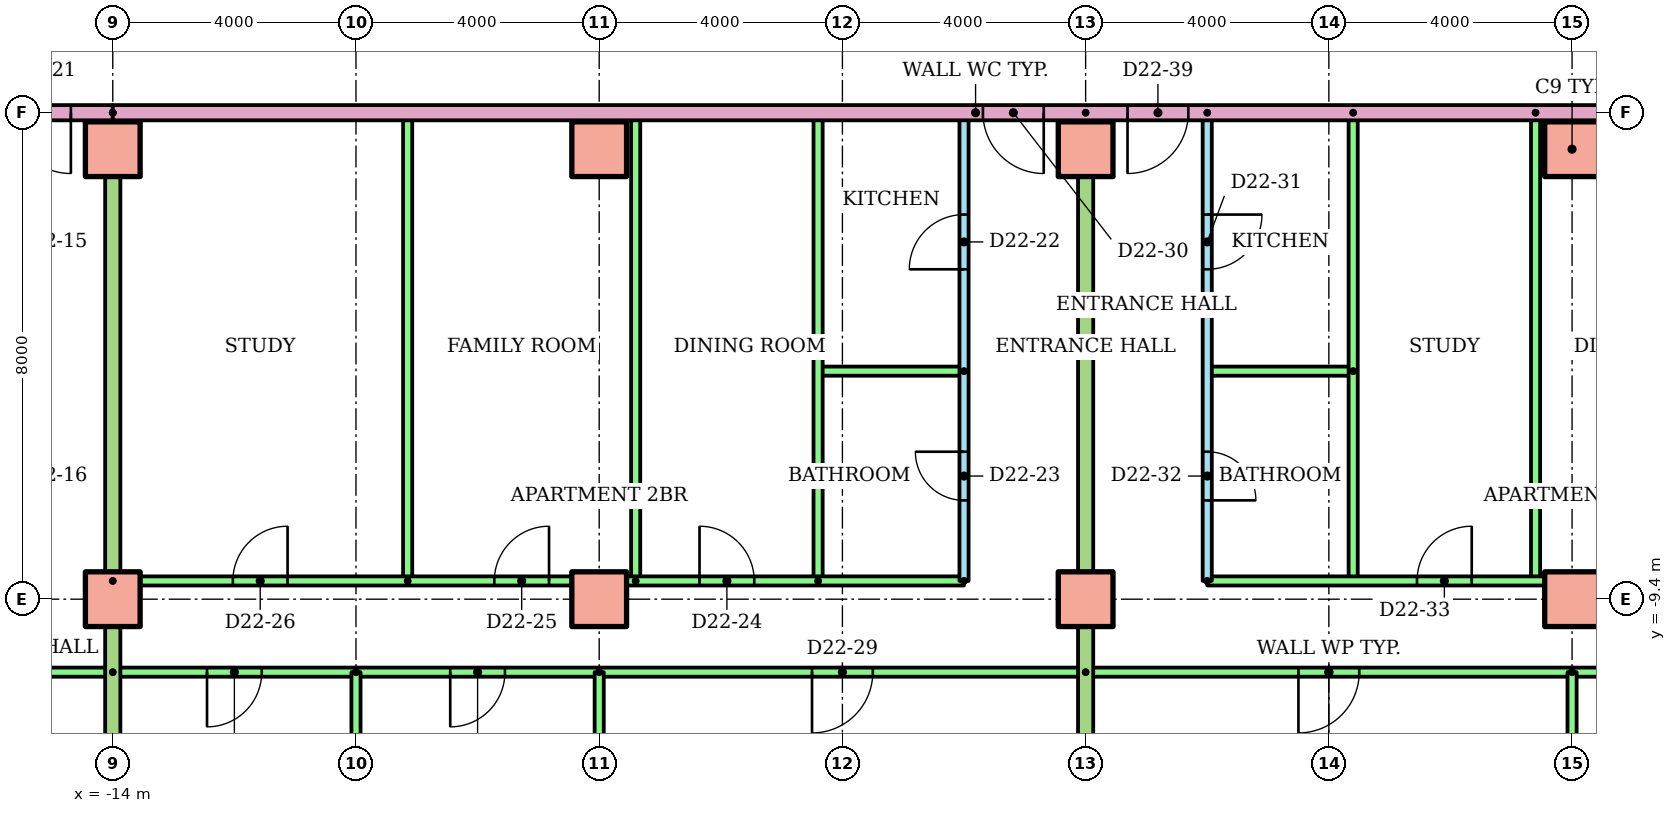
"""IFC4 building model, lengths in metres.
Left out: names, types, materials, properties, quantities, classifications, styles, units other than length and angle.
Written with IfcOpenShell. Run it as: python <this file> out.ifc"""

import sys

from ifc_helpers import new_model, si_unit, direction, frame, frame_2d, origin, origin_2d, place, context, subcontext, project, spatial, rectangle, extrude, element, fill, save


model = new_model("IFC4")
c1 = context("Model", 3, precision=1e-05, world=origin(), true_north=direction((0.0, 1.0)))
c2 = subcontext(c1, "Body", "Model", "MODEL_VIEW")
j1 = project(units=[si_unit("LENGTHUNIT", "METRE"), si_unit("PLANEANGLEUNIT", "RADIAN")], contexts=[c1])
p1 = place(None, origin())
s1 = spatial("IfcSite", under=j1, at=p1, CompositionType="ELEMENT")
p2 = place(p1, origin())
s2 = spatial("IfcBuilding", under=s1, at=p2, CompositionType="ELEMENT")
p3 = place(p2, frame((0.0, 0.0, 87.1)))
s3 = spatial("IfcBuildingStorey", under=s2, at=p3, CompositionType="ELEMENT", Elevation=87.1)
for number, where in (
    (1, (-14.0, -9.4, 0.0)),
    (2, (-6.0, -9.4, 0.0)),
    (3, (2.0, -9.4, 0.0)),
    (4, (10.0, -9.4, 0.0)),
    (5, (-14.0, -2.0, 0.0)),
    (6, (-6.0, -2.0, 0.0)),
    (7, (2.0, -2.0, 0.0)),
    (8, (10.0, -2.0, 0.0)),
):
    element("IfcColumn", number, at=place(p3, frame(where)), inside=s3, PredefinedType="COLUMN", context=c2, shape_type="SweptSolid", body=[
        extrude(rectangle(XDim=0.9, YDim=0.9, at=origin_2d()), origin(), (0.0, 0.0, 1.0), 3.2),
    ])
p4 = place(p3, frame((-14.0, -10.6, 0.0), z_axis=(0.0, 0.0, 1.0), x_axis=(-1.0, 0.0, 0.0)))
e9 = element("IfcWall", 9, at=p4, inside=s3, PredefinedType="PARTITIONING", context=c2, shape_type="SweptSolid", body=[
    extrude(rectangle(XDim=14.62, YDim=0.15, at=frame_2d((7.31, 0.0))), origin(), (0.0, 0.0, 1.0), 2.4),
])
p5 = place(p4, frame((11.7, 0.0, 0.0)))
e10 = element("IfcOpeningElement", 10, at=p5, cuts=e9, PredefinedType="OPENING", context=c2, shape_type="SweptSolid", body=[
    extrude(rectangle(XDim=0.9, YDim=2.1, at=frame_2d((0.45, 1.05))), frame((0.0, 0.085, 0.0), z_axis=(0.0, -1.0, 0.0), x_axis=(1.0, 0.0, 0.0)), (0.0, 0.0, 1.0), 0.17),
])
p6 = place(p4, frame((4.45, 0.0, 0.0)))
e11 = element("IfcOpeningElement", 11, at=p6, cuts=e9, PredefinedType="OPENING", context=c2, shape_type="SweptSolid", body=[
    extrude(rectangle(XDim=1.0, YDim=2.1, at=frame_2d((0.5, 1.05))), frame((0.0, 0.085, 0.0), z_axis=(0.0, -1.0, 0.0), x_axis=(1.0, 0.0, 0.0)), (0.0, 0.0, 1.0), 0.17),
])
p7 = place(p3, frame((0.0, -9.1, 0.0), z_axis=(0.0, 0.0, 1.0), x_axis=(0.0, 1.0, 0.0)))
e12 = element("IfcWall", 12, at=p7, inside=s3, PredefinedType="PARTITIONING", context=c2, shape_type="SweptSolid", body=[
    extrude(rectangle(XDim=7.7, YDim=0.15, at=frame_2d((3.85, 0.0))), origin(), (0.0, 0.0, 1.0), 2.4),
])
p8 = place(p7, frame((5.125, 0.0, 0.0)))
e13 = element("IfcOpeningElement", 13, at=p8, cuts=e12, PredefinedType="OPENING", context=c2, shape_type="SweptSolid", body=[
    extrude(rectangle(XDim=0.9, YDim=2.1, at=frame_2d((0.45, 1.05))), frame((0.0, 0.085, 0.0), z_axis=(0.0, -1.0, 0.0), x_axis=(1.0, 0.0, 0.0)), (0.0, 0.0, 1.0), 0.17),
])
p9 = place(p7, frame((1.325, 0.0, 0.0)))
e14 = element("IfcOpeningElement", 14, at=p9, cuts=e12, PredefinedType="OPENING", context=c2, shape_type="SweptSolid", body=[
    extrude(rectangle(XDim=0.8, YDim=2.1, at=frame_2d((0.4, 1.05))), frame((0.0, 0.085, 0.0), z_axis=(0.0, -1.0, 0.0), x_axis=(1.0, 0.0, 0.0)), (0.0, 0.0, 1.0), 0.17),
])
p10 = place(p3, frame((0.0, -5.65, 0.0), z_axis=(0.0, 0.0, 1.0), x_axis=(-1.0, 0.0, 0.0)))
e15 = element("IfcWall", 15, at=p10, inside=s3, PredefinedType="PARTITIONING", context=c2, shape_type="SweptSolid", body=[
    extrude(rectangle(XDim=2.4, YDim=0.15, at=frame_2d((1.2, 0.0))), origin(), (0.0, 0.0, 1.0), 2.4),
])
for number, where, z_axis, x_axis in (
    (16, (-2.4, -9.1, 0.0), (0.0, 0.0, 1.0), (0.0, 1.0, 0.0)),
    (17, (-5.4, -9.1, 0.0), (0.0, 0.0, 1.0), (0.0, 1.0, 0.0)),
    (18, (-9.15, -9.1, 0.0), (0.0, 0.0, 1.0), (0.0, 1.0, 0.0)),
):
    element("IfcWall", number, at=place(p3, frame(where, z_axis=z_axis, x_axis=x_axis)), inside=s3, PredefinedType="PARTITIONING", context=c2, shape_type="SweptSolid", body=[
        extrude(rectangle(XDim=7.7, YDim=0.15, at=frame_2d((3.85, 0.0))), origin(), (0.0, 0.0, 1.0), 2.4),
    ])
p11 = place(p3, frame((-14.0, -9.1, 0.0)))
e19 = element("IfcWall", 19, at=p11, inside=s3, PredefinedType="PARTITIONING", context=c2, shape_type="SweptSolid", body=[
    extrude(rectangle(XDim=14.0, YDim=0.15, at=frame_2d((7.0, 0.0))), origin(), (0.0, 0.0, 1.0), 2.4),
])
p12 = place(p11, frame((9.65, 0.0, 0.0)))
e20 = element("IfcOpeningElement", 20, at=p12, cuts=e19, PredefinedType="OPENING", context=c2, shape_type="SweptSolid", body=[
    extrude(rectangle(XDim=0.9, YDim=2.1, at=frame_2d((0.45, 1.05))), frame((0.0, 0.085, 0.0), z_axis=(0.0, -1.0, 0.0), x_axis=(1.0, 0.0, 0.0)), (0.0, 0.0, 1.0), 0.17),
])
p13 = place(p11, frame((6.275, 0.0, 0.0)))
e21 = element("IfcOpeningElement", 21, at=p13, cuts=e19, PredefinedType="OPENING", context=c2, shape_type="SweptSolid", body=[
    extrude(rectangle(XDim=0.9, YDim=2.1, at=frame_2d((0.45, 1.05))), frame((0.0, 0.085, 0.0), z_axis=(0.0, -1.0, 0.0), x_axis=(1.0, 0.0, 0.0)), (0.0, 0.0, 1.0), 0.17),
])
p14 = place(p11, frame((1.975, 0.0, 0.0)))
e22 = element("IfcOpeningElement", 22, at=p14, cuts=e19, PredefinedType="OPENING", context=c2, shape_type="SweptSolid", body=[
    extrude(rectangle(XDim=0.9, YDim=2.1, at=frame_2d((0.45, 1.05))), frame((0.0, 0.085, 0.0), z_axis=(0.0, -1.0, 0.0), x_axis=(1.0, 0.0, 0.0)), (0.0, 0.0, 1.0), 0.17),
])
p15 = place(p3, frame((2.0, -10.6, 0.0), z_axis=(0.0, 0.0, 1.0), x_axis=(-1.0, 0.0, 0.0)))
e23 = element("IfcWall", 23, at=p15, inside=s3, PredefinedType="PARTITIONING", context=c2, shape_type="SweptSolid", body=[
    extrude(rectangle(XDim=16.0, YDim=0.15, at=frame_2d((8.0, 0.0))), origin(), (0.0, 0.0, 1.0), 2.4),
])
p16 = place(p15, frame((13.55, 0.0, 0.0)))
e24 = element("IfcOpeningElement", 24, at=p16, cuts=e23, PredefinedType="OPENING", context=c2, shape_type="SweptSolid", body=[
    extrude(rectangle(XDim=0.9, YDim=2.1, at=frame_2d((0.45, 1.05))), frame((0.0, 0.085, 0.0), z_axis=(0.0, -1.0, 0.0), x_axis=(1.0, 0.0, 0.0)), (0.0, 0.0, 1.0), 0.17),
])
p17 = place(p15, frame((9.55, 0.0, 0.0)))
e25 = element("IfcOpeningElement", 25, at=p17, cuts=e23, PredefinedType="OPENING", context=c2, shape_type="SweptSolid", body=[
    extrude(rectangle(XDim=0.9, YDim=2.1, at=frame_2d((0.45, 1.05))), frame((0.0, 0.085, 0.0), z_axis=(0.0, -1.0, 0.0), x_axis=(1.0, 0.0, 0.0)), (0.0, 0.0, 1.0), 0.17),
])
p18 = place(p15, frame((3.5, 0.0, 0.0)))
e26 = element("IfcOpeningElement", 26, at=p18, cuts=e23, PredefinedType="OPENING", context=c2, shape_type="SweptSolid", body=[
    extrude(rectangle(XDim=1.0, YDim=2.1, at=frame_2d((0.5, 1.05))), frame((0.0, 0.085, 0.0), z_axis=(0.0, -1.0, 0.0), x_axis=(1.0, 0.0, 0.0)), (0.0, 0.0, 1.0), 0.17),
])
p19 = place(p3, frame((-10.0, -10.6, 0.0), z_axis=(0.0, 0.0, 1.0), x_axis=(0.0, -1.0, 0.0)))
e27 = element("IfcWall", 27, at=p19, inside=s3, PredefinedType="PARTITIONING", context=c2, shape_type="SweptSolid", body=[
    extrude(rectangle(XDim=5.621, YDim=0.15, at=frame_2d((2.811, 0.0))), origin(), (0.0, 0.0, 1.0), 2.4),
])
p20 = place(p3, frame((-6.0, -10.6, 0.0), z_axis=(0.0, 0.0, 1.0), x_axis=(0.0, -1.0, 0.0)))
e28 = element("IfcWall", 28, at=p20, inside=s3, PredefinedType="PARTITIONING", context=c2, shape_type="SweptSolid", body=[
    extrude(rectangle(XDim=5.61, YDim=0.15, at=frame_2d((2.805, 0.0))), origin(), (0.0, 0.0, 1.0), 2.4),
])
p21 = place(p3, frame((-14.0, -1.4, 0.0), z_axis=(0.0, 0.0, 1.0), x_axis=(0.0, -1.0, 0.0)))
e29 = element("IfcWall", 29, at=p21, inside=s3, PredefinedType="PARTITIONING", context=c2, shape_type="SweptSolid", body=[
    extrude(rectangle(XDim=14.81, YDim=0.25, at=frame_2d((7.405, 0.0))), origin(), (0.0, 0.0, 1.0), 2.4),
])
p22 = place(p3, frame((4.0, -1.4, 0.0), z_axis=(0.0, 0.0, 1.0), x_axis=(0.0, -1.0, 0.0)))
e30 = element("IfcWall", 30, at=p22, inside=s3, PredefinedType="PARTITIONING", context=c2, shape_type="SweptSolid", body=[
    extrude(rectangle(XDim=7.7, YDim=0.15, at=frame_2d((3.85, 0.0))), origin(), (0.0, 0.0, 1.0), 2.4),
])
p23 = place(p22, frame((1.675, 0.0, 0.0)))
e31 = element("IfcOpeningElement", 31, at=p23, cuts=e30, PredefinedType="OPENING", context=c2, shape_type="SweptSolid", body=[
    extrude(rectangle(XDim=0.9, YDim=2.1, at=frame_2d((0.45, 1.05))), frame((0.0, 0.085, 0.0), z_axis=(0.0, -1.0, 0.0), x_axis=(1.0, 0.0, 0.0)), (0.0, 0.0, 1.0), 0.17),
])
p24 = place(p22, frame((5.575, 0.0, 0.0)))
e32 = element("IfcOpeningElement", 32, at=p24, cuts=e30, PredefinedType="OPENING", context=c2, shape_type="SweptSolid", body=[
    extrude(rectangle(XDim=0.8, YDim=2.1, at=frame_2d((0.4, 1.05))), frame((0.0, 0.085, 0.0), z_axis=(0.0, -1.0, 0.0), x_axis=(1.0, 0.0, 0.0)), (0.0, 0.0, 1.0), 0.17),
])
p25 = place(p3, frame((6.4, -5.65, 0.0), z_axis=(0.0, 0.0, 1.0), x_axis=(-1.0, 0.0, 0.0)))
e33 = element("IfcWall", 33, at=p25, inside=s3, PredefinedType="PARTITIONING", context=c2, shape_type="SweptSolid", body=[
    extrude(rectangle(XDim=2.4, YDim=0.15, at=frame_2d((1.2, 0.0))), origin(), (0.0, 0.0, 1.0), 2.4),
])
for number, where, z_axis, x_axis in (
    (34, (6.4, -1.4, 0.0), (0.0, 0.0, 1.0), (0.0, -1.0, 0.0)),
    (35, (9.4, -1.4, 0.0), (0.0, 0.0, 1.0), (0.0, -1.0, 0.0)),
):
    element("IfcWall", number, at=place(p3, frame(where, z_axis=z_axis, x_axis=x_axis)), inside=s3, PredefinedType="PARTITIONING", context=c2, shape_type="SweptSolid", body=[
        extrude(rectangle(XDim=7.7, YDim=0.15, at=frame_2d((3.85, 0.0))), origin(), (0.0, 0.0, 1.0), 2.4),
    ])
p26 = place(p3, frame((4.0, -9.1, 0.0)))
e36 = element("IfcWall", 36, at=p26, inside=s3, PredefinedType="PARTITIONING", context=c2, shape_type="SweptSolid", body=[
    extrude(rectangle(XDim=14.0, YDim=0.15, at=frame_2d((7.0, 0.0))), origin(), (0.0, 0.0, 1.0), 2.4),
])
p27 = place(p26, frame((3.45, 0.0, 0.0)))
e37 = element("IfcOpeningElement", 37, at=p27, cuts=e36, PredefinedType="OPENING", context=c2, shape_type="SweptSolid", body=[
    extrude(rectangle(XDim=0.9, YDim=2.1, at=frame_2d((0.45, 1.05))), frame((0.0, 0.085, 0.0), z_axis=(0.0, -1.0, 0.0), x_axis=(1.0, 0.0, 0.0)), (0.0, 0.0, 1.0), 0.17),
])
p28 = place(p26, frame((6.825, 0.0, 0.0)))
e38 = element("IfcOpeningElement", 38, at=p28, cuts=e36, PredefinedType="OPENING", context=c2, shape_type="SweptSolid", body=[
    extrude(rectangle(XDim=0.9, YDim=2.1, at=frame_2d((0.45, 1.05))), frame((0.0, 0.085, 0.0), z_axis=(0.0, -1.0, 0.0), x_axis=(1.0, 0.0, 0.0)), (0.0, 0.0, 1.0), 0.17),
])
p29 = place(p26, frame((11.125, 0.0, 0.0)))
e39 = element("IfcOpeningElement", 39, at=p29, cuts=e36, PredefinedType="OPENING", context=c2, shape_type="SweptSolid", body=[
    extrude(rectangle(XDim=0.9, YDim=2.1, at=frame_2d((0.45, 1.05))), frame((0.0, 0.085, 0.0), z_axis=(0.0, -1.0, 0.0), x_axis=(1.0, 0.0, 0.0)), (0.0, 0.0, 1.0), 0.17),
])
p30 = place(p3, frame((18.0, -10.6, 0.0), z_axis=(0.0, 0.0, 1.0), x_axis=(-1.0, 0.0, 0.0)))
e40 = element("IfcWall", 40, at=p30, inside=s3, PredefinedType="PARTITIONING", context=c2, shape_type="SweptSolid", body=[
    extrude(rectangle(XDim=16.0, YDim=0.15, at=frame_2d((8.0, 0.0))), origin(), (0.0, 0.0, 1.0), 2.4),
])
p31 = place(p30, frame((11.5, 0.0, 0.0)))
e41 = element("IfcOpeningElement", 41, at=p31, cuts=e40, PredefinedType="OPENING", context=c2, shape_type="SweptSolid", body=[
    extrude(rectangle(XDim=1.0, YDim=2.1, at=frame_2d((0.5, 1.05))), frame((0.0, 0.085, 0.0), z_axis=(0.0, -1.0, 0.0), x_axis=(1.0, 0.0, 0.0)), (0.0, 0.0, 1.0), 0.17),
])
p32 = place(p30, frame((5.55, 0.0, 0.0)))
e42 = element("IfcOpeningElement", 42, at=p32, cuts=e40, PredefinedType="OPENING", context=c2, shape_type="SweptSolid", body=[
    extrude(rectangle(XDim=0.9, YDim=2.1, at=frame_2d((0.45, 1.05))), frame((0.0, 0.085, 0.0), z_axis=(0.0, -1.0, 0.0), x_axis=(1.0, 0.0, 0.0)), (0.0, 0.0, 1.0), 0.17),
])
p33 = place(p30, frame((1.55, 0.0, 0.0)))
e43 = element("IfcOpeningElement", 43, at=p33, cuts=e40, PredefinedType="OPENING", context=c2, shape_type="SweptSolid", body=[
    extrude(rectangle(XDim=0.9, YDim=2.1, at=frame_2d((0.45, 1.05))), frame((0.0, 0.085, 0.0), z_axis=(0.0, -1.0, 0.0), x_axis=(1.0, 0.0, 0.0)), (0.0, 0.0, 1.0), 0.17),
])
p34 = place(p3, frame((10.0, -10.6, 0.0), z_axis=(0.0, 0.0, 1.0), x_axis=(0.0, -1.0, 0.0)))
e44 = element("IfcWall", 44, at=p34, inside=s3, PredefinedType="PARTITIONING", context=c2, shape_type="SweptSolid", body=[
    extrude(rectangle(XDim=5.61, YDim=0.15, at=frame_2d((2.805, 0.0))), origin(), (0.0, 0.0, 1.0), 2.4),
])
p35 = place(p3, frame((2.0, -1.4, 0.0), z_axis=(0.0, 0.0, 1.0), x_axis=(0.0, -1.0, 0.0)))
e45 = element("IfcWall", 45, at=p35, inside=s3, PredefinedType="PARTITIONING", context=c2, shape_type="SweptSolid", body=[
    extrude(rectangle(XDim=14.81, YDim=0.25, at=frame_2d((7.405, 0.0))), origin(), (0.0, 0.0, 1.0), 2.4),
])
p36 = place(p3, frame((-14.0, -1.4, 0.0), z_axis=(0.0, 0.0, 1.0), x_axis=(-1.0, 0.0, 0.0)))
e46 = element("IfcWall", 46, at=p36, inside=s3, PredefinedType="PARTITIONING", context=c2, shape_type="SweptSolid", body=[
    extrude(rectangle(XDim=14.62, YDim=0.25, at=frame_2d((7.31, 0.0))), origin(), (0.0, 0.0, 1.0), 2.4),
])
p37 = place(p36, frame((0.689, 0.0, 0.0)))
e47 = element("IfcOpeningElement", 47, at=p37, cuts=e46, PredefinedType="OPENING", context=c2, shape_type="SweptSolid", body=[
    extrude(rectangle(XDim=1.0, YDim=2.1, at=frame_2d((0.5, 1.05))), frame((0.0, 0.135, 0.0), z_axis=(0.0, -1.0, 0.0), x_axis=(1.0, 0.0, 0.0)), (0.0, 0.0, 1.0), 0.27),
])
p38 = place(p3, frame((14.0, -1.4, 0.0), z_axis=(0.0, 0.0, 1.0), x_axis=(-1.0, 0.0, 0.0)))
e48 = element("IfcWall", 48, at=p38, inside=s3, PredefinedType="PARTITIONING", context=c2, shape_type="SweptSolid", body=[
    extrude(rectangle(XDim=28.0, YDim=0.25, at=frame_2d((14.0, 0.0))), origin(), (0.0, 0.0, 1.0), 2.4),
])
p39 = place(p38, frame((12.689, 0.0, 0.0)))
e49 = element("IfcOpeningElement", 49, at=p39, cuts=e48, PredefinedType="OPENING", context=c2, shape_type="SweptSolid", body=[
    extrude(rectangle(XDim=1.0, YDim=2.1, at=frame_2d((0.5, 1.05))), frame((0.0, 0.135, 0.0), z_axis=(0.0, -1.0, 0.0), x_axis=(1.0, 0.0, 0.0)), (0.0, 0.0, 1.0), 0.27),
])
p40 = place(p38, frame((10.311, 0.0, 0.0)))
e50 = element("IfcOpeningElement", 50, at=p40, cuts=e48, PredefinedType="OPENING", context=c2, shape_type="SweptSolid", body=[
    extrude(rectangle(XDim=1.0, YDim=2.1, at=frame_2d((0.5, 1.05))), frame((0.0, 0.135, 0.0), z_axis=(0.0, -1.0, 0.0), x_axis=(1.0, 0.0, 0.0)), (0.0, 0.0, 1.0), 0.27),
])
p41 = place(p37, origin())
e51 = element("IfcDoor", 51, at=p41, inside=s3, OperationType="SINGLE_SWING_LEFT", PredefinedType="DOOR", context=c2, shape_type="SweptSolid", body=[
    extrude(rectangle(XDim=1.0, YDim=2.1, at=frame_2d((0.5, 1.05))), frame((0.0, 0.025, 0.0), z_axis=(0.0, -1.0, 0.0), x_axis=(1.0, 0.0, 0.0)), (0.0, 0.0, 1.0), 0.05),
])
fill(e47, e51)
p42 = place(p8, origin())
e52 = element("IfcDoor", 52, at=p42, inside=s3, OperationType="SINGLE_SWING_LEFT", PredefinedType="DOOR", context=c2, shape_type="SweptSolid", body=[
    extrude(rectangle(XDim=0.9, YDim=2.1, at=frame_2d((0.45, 1.05))), frame((0.0, 0.025, 0.0), z_axis=(0.0, -1.0, 0.0), x_axis=(1.0, 0.0, 0.0)), (0.0, 0.0, 1.0), 0.05),
])
fill(e13, e52)
p43 = place(p9, origin())
e53 = element("IfcDoor", 53, at=p43, inside=s3, OperationType="SINGLE_SWING_RIGHT", PredefinedType="DOOR", context=c2, shape_type="SweptSolid", body=[
    extrude(rectangle(XDim=0.8, YDim=2.1, at=frame_2d((0.4, 1.05))), frame((0.0, 0.025, 0.0), z_axis=(0.0, -1.0, 0.0), x_axis=(1.0, 0.0, 0.0)), (0.0, 0.0, 1.0), 0.05),
])
fill(e14, e53)
p44 = place(p12, origin())
e54 = element("IfcDoor", 54, at=p44, inside=s3, OperationType="SINGLE_SWING_LEFT", PredefinedType="DOOR", context=c2, shape_type="SweptSolid", body=[
    extrude(rectangle(XDim=0.9, YDim=2.1, at=frame_2d((0.45, 1.05))), frame((0.0, 0.025, 0.0), z_axis=(0.0, -1.0, 0.0), x_axis=(1.0, 0.0, 0.0)), (0.0, 0.0, 1.0), 0.05),
])
fill(e20, e54)
p45 = place(p13, origin())
e55 = element("IfcDoor", 55, at=p45, inside=s3, OperationType="SINGLE_SWING_RIGHT", PredefinedType="DOOR", context=c2, shape_type="SweptSolid", body=[
    extrude(rectangle(XDim=0.9, YDim=2.1, at=frame_2d((0.45, 1.05))), frame((0.0, 0.025, 0.0), z_axis=(0.0, -1.0, 0.0), x_axis=(1.0, 0.0, 0.0)), (0.0, 0.0, 1.0), 0.05),
])
fill(e21, e55)
p46 = place(p14, origin())
e56 = element("IfcDoor", 56, at=p46, inside=s3, OperationType="SINGLE_SWING_RIGHT", PredefinedType="DOOR", context=c2, shape_type="SweptSolid", body=[
    extrude(rectangle(XDim=0.9, YDim=2.1, at=frame_2d((0.45, 1.05))), frame((0.0, 0.025, 0.0), z_axis=(0.0, -1.0, 0.0), x_axis=(1.0, 0.0, 0.0)), (0.0, 0.0, 1.0), 0.05),
])
fill(e22, e56)
p47 = place(p16, origin())
e57 = element("IfcDoor", 57, at=p47, inside=s3, OperationType="SINGLE_SWING_RIGHT", PredefinedType="DOOR", context=c2, shape_type="SweptSolid", body=[
    extrude(rectangle(XDim=0.9, YDim=2.1, at=frame_2d((0.45, 1.05))), frame((0.0, 0.025, 0.0), z_axis=(0.0, -1.0, 0.0), x_axis=(1.0, 0.0, 0.0)), (0.0, 0.0, 1.0), 0.05),
])
fill(e24, e57)
p48 = place(p17, origin())
e58 = element("IfcDoor", 58, at=p48, inside=s3, OperationType="SINGLE_SWING_RIGHT", PredefinedType="DOOR", context=c2, shape_type="SweptSolid", body=[
    extrude(rectangle(XDim=0.9, YDim=2.1, at=frame_2d((0.45, 1.05))), frame((0.0, 0.025, 0.0), z_axis=(0.0, -1.0, 0.0), x_axis=(1.0, 0.0, 0.0)), (0.0, 0.0, 1.0), 0.05),
])
fill(e25, e58)
p49 = place(p18, origin())
e59 = element("IfcDoor", 59, at=p49, inside=s3, OperationType="SINGLE_SWING_RIGHT", PredefinedType="DOOR", context=c2, shape_type="SweptSolid", body=[
    extrude(rectangle(XDim=1.0, YDim=2.1, at=frame_2d((0.5, 1.05))), frame((0.0, 0.025, 0.0), z_axis=(0.0, -1.0, 0.0), x_axis=(1.0, 0.0, 0.0)), (0.0, 0.0, 1.0), 0.05),
])
fill(e26, e59)
p50 = place(p39, origin())
e60 = element("IfcDoor", 60, at=p50, inside=s3, OperationType="SINGLE_SWING_LEFT", PredefinedType="DOOR", context=c2, shape_type="SweptSolid", body=[
    extrude(rectangle(XDim=1.0, YDim=2.1, at=frame_2d((0.5, 1.05))), frame((0.0, 0.025, 0.0), z_axis=(0.0, -1.0, 0.0), x_axis=(1.0, 0.0, 0.0)), (0.0, 0.0, 1.0), 0.05),
])
fill(e49, e60)
p51 = place(p23, origin())
e61 = element("IfcDoor", 61, at=p51, inside=s3, OperationType="SINGLE_SWING_LEFT", PredefinedType="DOOR", context=c2, shape_type="SweptSolid", body=[
    extrude(rectangle(XDim=0.9, YDim=2.1, at=frame_2d((0.45, 1.05))), frame((0.0, 0.025, 0.0), z_axis=(0.0, -1.0, 0.0), x_axis=(1.0, 0.0, 0.0)), (0.0, 0.0, 1.0), 0.05),
])
fill(e31, e61)
p52 = place(p24, origin())
e62 = element("IfcDoor", 62, at=p52, inside=s3, OperationType="SINGLE_SWING_RIGHT", PredefinedType="DOOR", context=c2, shape_type="SweptSolid", body=[
    extrude(rectangle(XDim=0.8, YDim=2.1, at=frame_2d((0.4, 1.05))), frame((0.0, 0.025, 0.0), z_axis=(0.0, -1.0, 0.0), x_axis=(1.0, 0.0, 0.0)), (0.0, 0.0, 1.0), 0.05),
])
fill(e32, e62)
p53 = place(p27, origin())
e63 = element("IfcDoor", 63, at=p53, inside=s3, OperationType="SINGLE_SWING_RIGHT", PredefinedType="DOOR", context=c2, shape_type="SweptSolid", body=[
    extrude(rectangle(XDim=0.9, YDim=2.1, at=frame_2d((0.45, 1.05))), frame((0.0, 0.025, 0.0), z_axis=(0.0, -1.0, 0.0), x_axis=(1.0, 0.0, 0.0)), (0.0, 0.0, 1.0), 0.05),
])
fill(e37, e63)
p54 = place(p31, origin())
e64 = element("IfcDoor", 64, at=p54, inside=s3, OperationType="SINGLE_SWING_RIGHT", PredefinedType="DOOR", context=c2, shape_type="SweptSolid", body=[
    extrude(rectangle(XDim=1.0, YDim=2.1, at=frame_2d((0.5, 1.05))), frame((0.0, 0.025, 0.0), z_axis=(0.0, -1.0, 0.0), x_axis=(1.0, 0.0, 0.0)), (0.0, 0.0, 1.0), 0.05),
])
fill(e41, e64)
p55 = place(p40, origin())
e65 = element("IfcDoor", 65, at=p55, inside=s3, OperationType="SINGLE_SWING_RIGHT", PredefinedType="DOOR", context=c2, shape_type="SweptSolid", body=[
    extrude(rectangle(XDim=1.0, YDim=2.1, at=frame_2d((0.5, 1.05))), frame((0.0, 0.025, 0.0), z_axis=(0.0, -1.0, 0.0), x_axis=(1.0, 0.0, 0.0)), (0.0, 0.0, 1.0), 0.05),
])
fill(e50, e65)
save(model, sys.argv[1])
